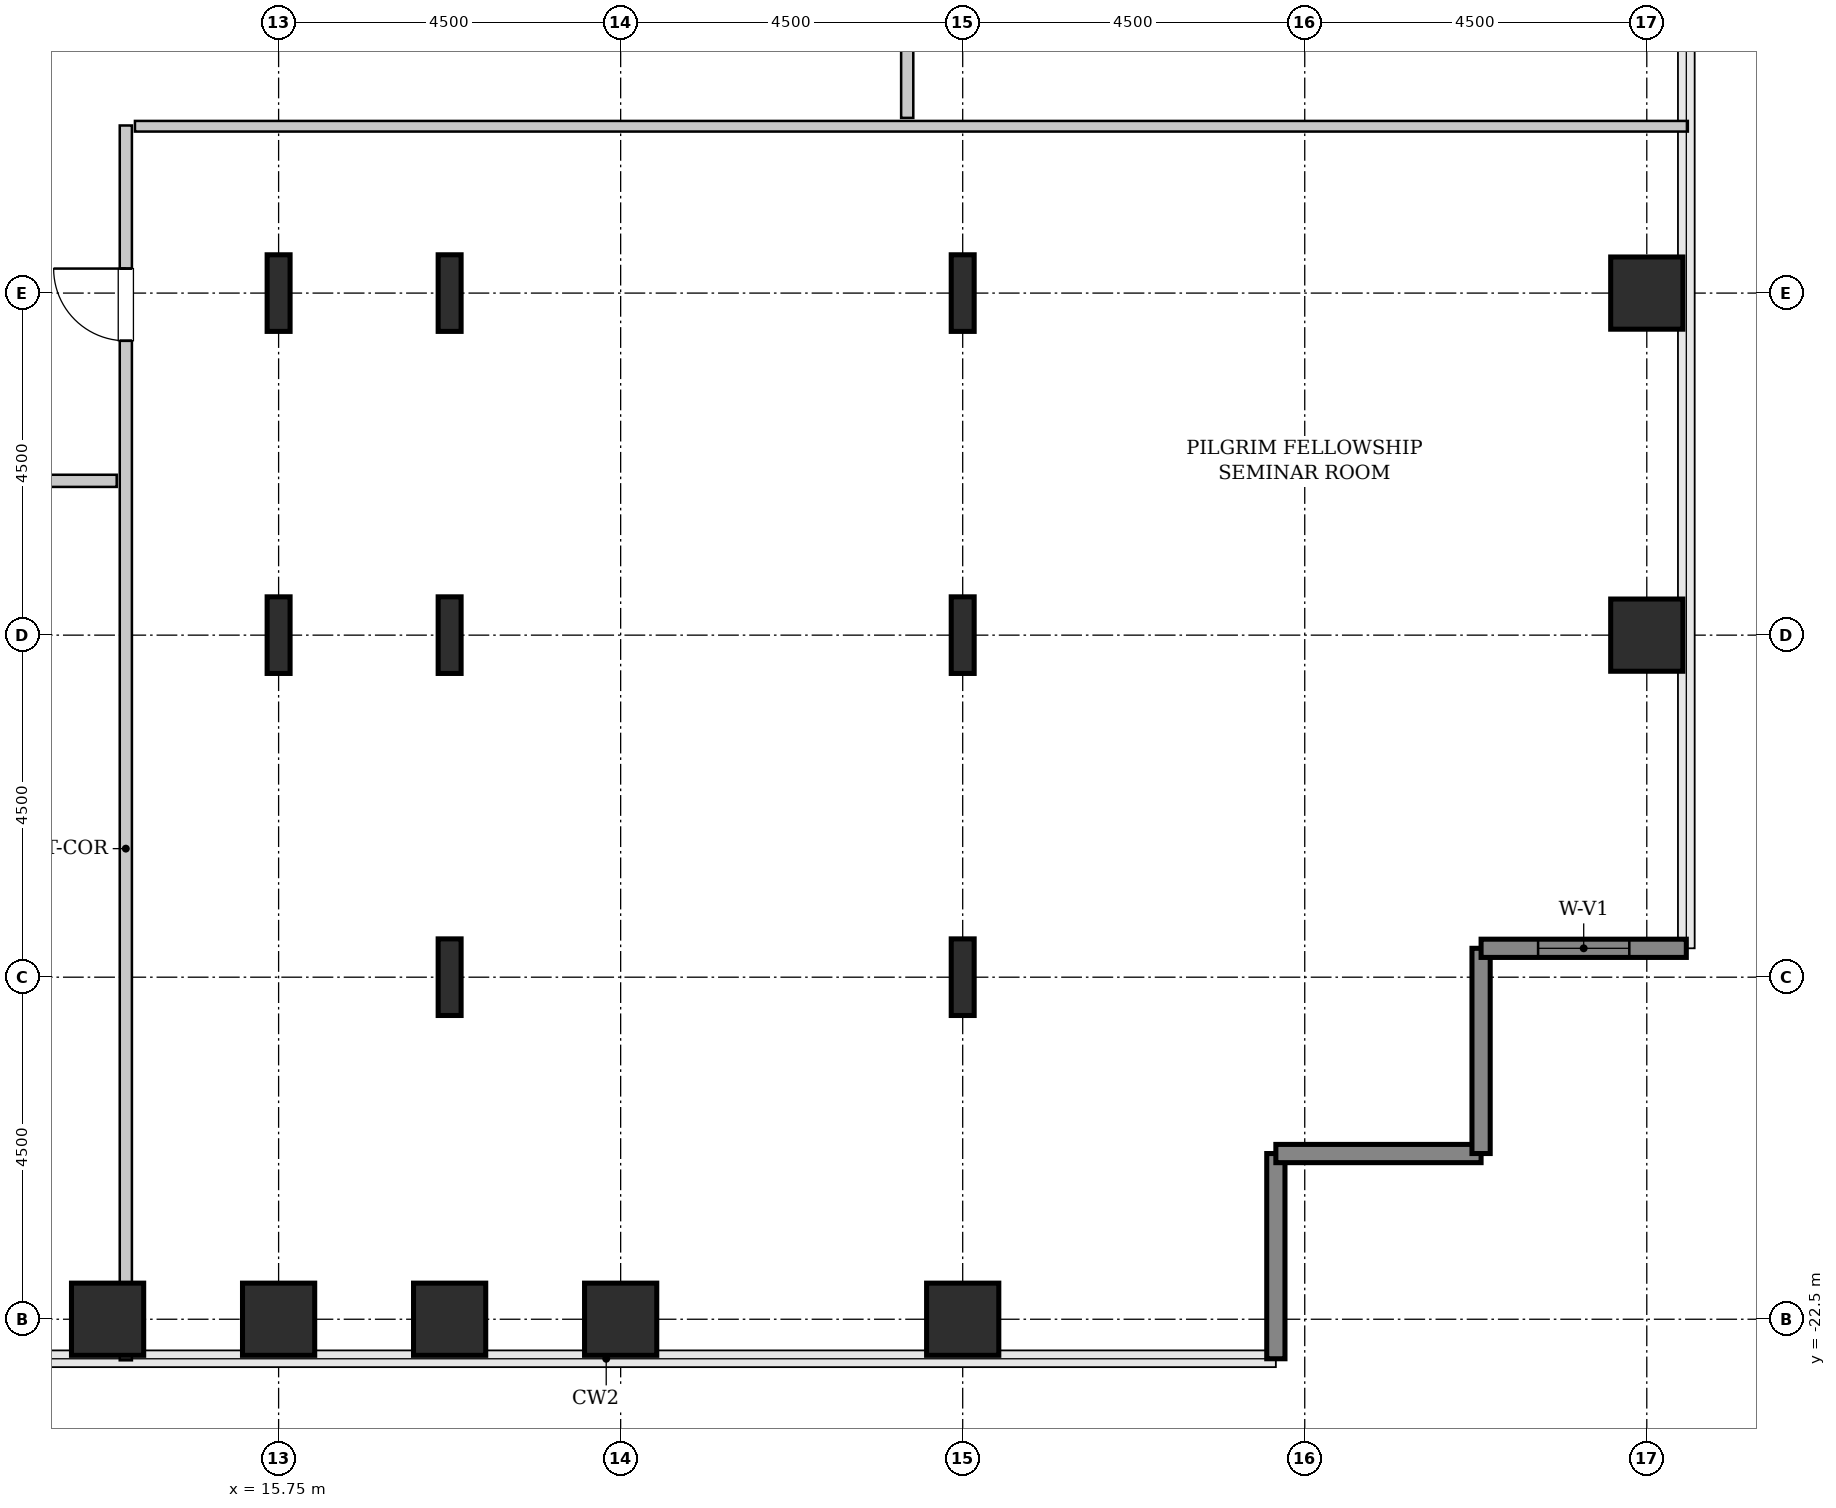
"""IFC4 building model, lengths in metres.
Left out: names, types, materials, properties, quantities, classifications, styles, units other than length and angle.
Written with IfcOpenShell. Run it as: python <this file> out.ifc"""

import sys

from ifc_helpers import new_model, si_unit, direction, frame, frame_2d, origin, origin_2d, place, context, subcontext, project, spatial, rectangle, hollow_rectangle, i_section, extrude, source, transform, mapped, element, fill, save


model = new_model("IFC4")
c1 = context("Model", 3, precision=1e-05, world=origin(), true_north=direction((0.0, 1.0)))
c2 = subcontext(c1, "Body", "Model", "MODEL_VIEW")
j1 = project(units=[si_unit("LENGTHUNIT", "METRE"), si_unit("PLANEANGLEUNIT", "RADIAN")], contexts=[c1])
p1 = place(None, origin())
s1 = spatial("IfcSite", under=j1, at=p1, CompositionType="ELEMENT")
p2 = place(p1, origin())
s2 = spatial("IfcBuilding", under=s1, at=p2, CompositionType="ELEMENT")
p3 = place(p2, frame((0.0, 0.0, 94.6)))
s3 = spatial("IfcBuildingStorey", under=s2, at=p3, CompositionType="ELEMENT", Elevation=94.6)
m1 = source(origin(), c2, "Body", "SweptSolid", [
    extrude(hollow_rectangle(XDim=0.95, YDim=0.95, WallThickness=0.045, InnerFilletRadius=0.045, OuterFilletRadius=0.09, at=origin_2d()), origin(), (0.0, 0.0, 1.0), 3.8),
])
for number, where, z_axis, x_axis in (
    (1, (13.5, -22.5, 0.0), (0.0, 0.0, 1.0), (1.0, 0.0, 0.0)),
    (2, (15.75, -22.5, 0.0), (0.0, 0.0, 1.0), (1.0, 0.0, 0.0)),
):
    element("IfcColumn", number, at=place(p3, frame(where, z_axis=z_axis, x_axis=x_axis)), inside=s3, PredefinedType="COLUMN", context=c2, shape_type="MappedRepresentation", body=[
        mapped(m1, transform((0.0, 0.0, 0.0), x_axis=(1.0, 0.0, 0.0), y_axis=(0.0, 1.0, 0.0), z_axis=(0.0, 0.0, 1.0), scale=1.0)),
    ])
m2 = source(origin(), c2, "Body", "SweptSolid", [
    extrude(i_section(OverallWidth=0.302, OverallDepth=1.008, WebThickness=0.021, FlangeThickness=0.04, FilletRadius=0.03, at=origin_2d()), origin(), (0.0, 0.0, 1.0), 3.8),
])
for number, where, z_axis, x_axis in (
    (3, (15.75, -13.5, 0.0), (0.0, 0.0, 1.0), (1.0, 0.0, 0.0)),
    (4, (15.75, -9.0, 0.0), (0.0, 0.0, 1.0), (1.0, 0.0, 0.0)),
):
    element("IfcColumn", number, at=place(p3, frame(where, z_axis=z_axis, x_axis=x_axis)), inside=s3, PredefinedType="COLUMN", context=c2, shape_type="MappedRepresentation", body=[
        mapped(m2, transform((0.0, 0.0, 0.0), x_axis=(1.0, 0.0, 0.0), y_axis=(0.0, 1.0, 0.0), z_axis=(0.0, 0.0, 1.0), scale=1.0)),
    ])
p4 = place(p3, frame((18.0, -22.5, 0.0), z_axis=(0.0, 0.0, 1.0), x_axis=(1.0, 0.0, 0.0)))
e5 = element("IfcColumn", 5, at=p4, inside=s3, PredefinedType="COLUMN", context=c2, shape_type="MappedRepresentation", body=[
    mapped(m1, transform((0.0, 0.0, 0.0), x_axis=(1.0, 0.0, 0.0), y_axis=(0.0, 1.0, 0.0), z_axis=(0.0, 0.0, 1.0), scale=1.0)),
])
for number, where, z_axis, x_axis in (
    (6, (18.0, -18.0, 0.0), (0.0, 0.0, 1.0), (1.0, 0.0, 0.0)),
    (7, (18.0, -13.5, 0.0), (0.0, 0.0, 1.0), (1.0, 0.0, 0.0)),
    (8, (18.0, -9.0, 0.0), (0.0, 0.0, 1.0), (1.0, 0.0, 0.0)),
):
    element("IfcColumn", number, at=place(p3, frame(where, z_axis=z_axis, x_axis=x_axis)), inside=s3, PredefinedType="COLUMN", context=c2, shape_type="MappedRepresentation", body=[
        mapped(m2, transform((0.0, 0.0, 0.0), x_axis=(1.0, 0.0, 0.0), y_axis=(0.0, 1.0, 0.0), z_axis=(0.0, 0.0, 1.0), scale=1.0)),
    ])
for number, where, z_axis, x_axis in (
    (9, (20.25, -22.5, 0.0), (0.0, 0.0, 1.0), (1.0, 0.0, 0.0)),
    (10, (24.75, -22.5, 0.0), (0.0, 0.0, 1.0), (1.0, 0.0, 0.0)),
):
    element("IfcColumn", number, at=place(p3, frame(where, z_axis=z_axis, x_axis=x_axis)), inside=s3, PredefinedType="COLUMN", context=c2, shape_type="MappedRepresentation", body=[
        mapped(m1, transform((0.0, 0.0, 0.0), x_axis=(1.0, 0.0, 0.0), y_axis=(0.0, 1.0, 0.0), z_axis=(0.0, 0.0, 1.0), scale=1.0)),
    ])
for number, where, z_axis, x_axis in (
    (11, (24.75, -18.0, 0.0), (0.0, 0.0, 1.0), (1.0, 0.0, 0.0)),
    (12, (24.75, -13.5, 0.0), (0.0, 0.0, 1.0), (1.0, 0.0, 0.0)),
    (13, (24.75, -9.0, 0.0), (0.0, 0.0, 1.0), (1.0, 0.0, 0.0)),
):
    element("IfcColumn", number, at=place(p3, frame(where, z_axis=z_axis, x_axis=x_axis)), inside=s3, PredefinedType="COLUMN", context=c2, shape_type="MappedRepresentation", body=[
        mapped(m2, transform((0.0, 0.0, 0.0), x_axis=(1.0, 0.0, 0.0), y_axis=(0.0, 1.0, 0.0), z_axis=(0.0, 0.0, 1.0), scale=1.0)),
    ])
for number, where, z_axis, x_axis in (
    (14, (33.75, -13.5, 0.0), (0.0, 0.0, 1.0), (1.0, 0.0, 0.0)),
    (15, (33.75, -9.0, 0.0), (0.0, 0.0, 1.0), (1.0, 0.0, 0.0)),
):
    element("IfcColumn", number, at=place(p3, frame(where, z_axis=z_axis, x_axis=x_axis)), inside=s3, PredefinedType="COLUMN", context=c2, shape_type="MappedRepresentation", body=[
        mapped(m1, transform((0.0, 0.0, 0.0), x_axis=(1.0, 0.0, 0.0), y_axis=(0.0, 1.0, 0.0), z_axis=(0.0, 0.0, 1.0), scale=1.0)),
    ])
m3 = source(origin(), c2, "Body", "SweptSolid", [
    extrude(rectangle(XDim=2.7, YDim=0.24, at=frame_2d((1.35, 0.0))), origin(), (0.0, 0.0, 1.0), 3.55),
])
for number, where, z_axis, x_axis in (
    (16, (28.87, -23.02, 0.0), (0.0, 0.0, 1.0), (0.0, 1.0, 0.0)),
    (17, (28.87, -20.32, 0.0), (0.0, 0.0, 1.0), (1.0, 0.0, 0.0)),
    (18, (31.57, -20.32, 0.0), (0.0, 0.0, 1.0), (0.0, 1.0, 0.0)),
):
    element("IfcWall", number, at=place(p3, frame(where, z_axis=z_axis, x_axis=x_axis)), inside=s3, PredefinedType="SHEAR", context=c2, shape_type="MappedRepresentation", body=[
        mapped(m3, transform((0.0, 0.0, 0.0), x_axis=(1.0, 0.0, 0.0), y_axis=(0.0, 1.0, 0.0), z_axis=(0.0, 0.0, 1.0), scale=1.0)),
    ])
p5 = place(p3, frame((31.57, -17.62, 0.0), z_axis=(0.0, 0.0, 1.0), x_axis=(1.0, 0.0, 0.0)))
e19 = element("IfcWall", 19, at=p5, inside=s3, PredefinedType="SHEAR", context=c2, shape_type="MappedRepresentation", body=[
    mapped(m3, transform((0.0, 0.0, 0.0), x_axis=(1.0, 0.0, 0.0), y_axis=(0.0, 1.0, 0.0), z_axis=(0.0, 0.0, 1.0), scale=1.0)),
])
p6 = place(p5, frame((0.75, 0.0, 0.85)))
e20 = element("IfcOpeningElement", 20, at=p6, cuts=e19, PredefinedType="OPENING", context=c2, shape_type="SweptSolid", body=[
    extrude(rectangle(XDim=1.2, YDim=1.8, at=frame_2d((0.6, 0.9))), frame((0.0, 0.13, 0.0), z_axis=(0.0, -1.0, 0.0), x_axis=(1.0, 0.0, 0.0)), (0.0, 0.0, 1.0), 0.26),
])
m4 = source(origin(), c2, "Body", "SweptSolid", [
    extrude(rectangle(XDim=16.245, YDim=0.16, at=frame_2d((8.123, 0.0))), origin(), (0.0, 0.0, 1.0), 3.535),
])
p7 = place(p3, frame((13.74, -23.04, 0.0), z_axis=(0.0, 0.0, 1.0), x_axis=(0.0, 1.0, 0.0)))
e21 = element("IfcWall", 21, at=p7, inside=s3, PredefinedType="PARTITIONING", context=c2, shape_type="MappedRepresentation", body=[
    mapped(m4, transform((0.0, 0.0, 0.0), x_axis=(1.0, 0.0, 0.0), y_axis=(0.0, 1.0, 0.0), z_axis=(0.0, 0.0, 1.0), scale=1.0)),
])
p8 = place(p7, frame((13.413, 0.0, 0.0)))
e22 = element("IfcOpeningElement", 22, at=p8, cuts=e21, PredefinedType="OPENING", context=c2, shape_type="SweptSolid", body=[
    extrude(rectangle(XDim=0.95, YDim=2.1, at=frame_2d((0.475, 1.05))), frame((0.0, 0.09, 0.0), z_axis=(0.0, -1.0, 0.0), x_axis=(1.0, 0.0, 0.0)), (0.0, 0.0, 1.0), 0.18),
])
m5 = source(origin(), c2, "Body", "SweptSolid", [
    extrude(rectangle(XDim=20.43, YDim=0.14, at=frame_2d((10.215, 0.0))), origin(), (0.0, 0.0, 1.0), 3.535),
])
p9 = place(p3, frame((13.86, -6.805, 0.0), z_axis=(0.0, 0.0, 1.0), x_axis=(1.0, 0.0, 0.0)))
e23 = element("IfcWall", 23, at=p9, inside=s3, PredefinedType="PARTITIONING", context=c2, shape_type="MappedRepresentation", body=[
    mapped(m5, transform((0.0, 0.0, 0.0), x_axis=(1.0, 0.0, 0.0), y_axis=(0.0, 1.0, 0.0), z_axis=(0.0, 0.0, 1.0), scale=1.0)),
])
m6 = source(origin(), c2, "Body", "SweptSolid", [
    extrude(rectangle(XDim=13.5, YDim=0.16, at=frame_2d((6.75, 0.0))), origin(), (0.0, 0.0, 1.0), 3.535),
])
p10 = place(p3, frame((24.02, -6.695, 0.0), z_axis=(0.0, 0.0, 1.0), x_axis=(0.0, 1.0, 0.0)))
e24 = element("IfcWall", 24, at=p10, inside=s3, PredefinedType="PARTITIONING", context=c2, shape_type="MappedRepresentation", body=[
    mapped(m6, transform((0.0, 0.0, 0.0), x_axis=(1.0, 0.0, 0.0), y_axis=(0.0, 1.0, 0.0), z_axis=(0.0, 0.0, 1.0), scale=1.0)),
])
p11 = place(p10, frame((3.97, 0.0, 0.0)))
e25 = element("IfcOpeningElement", 25, at=p11, cuts=e24, PredefinedType="OPENING", context=c2, shape_type="SweptSolid", body=[
    extrude(rectangle(XDim=0.95, YDim=2.1, at=frame_2d((0.475, 1.05))), frame((0.0, 0.09, 0.0), z_axis=(0.0, -1.0, 0.0), x_axis=(1.0, 0.0, 0.0)), (0.0, 0.0, 1.0), 0.18),
])
m7 = source(origin(), c2, "Body", "SweptSolid", [
    extrude(rectangle(XDim=6.225, YDim=0.16, at=frame_2d((3.113, 0.0))), origin(), (0.0, 0.0, 1.0), 3.535),
])
p12 = place(p3, frame((7.395, -11.47, 0.0), z_axis=(0.0, 0.0, 1.0), x_axis=(1.0, 0.0, 0.0)))
e26 = element("IfcWall", 26, at=p12, inside=s3, PredefinedType="PARTITIONING", context=c2, shape_type="MappedRepresentation", body=[
    mapped(m7, transform((0.0, 0.0, 0.0), x_axis=(1.0, 0.0, 0.0), y_axis=(0.0, 1.0, 0.0), z_axis=(0.0, 0.0, 1.0), scale=1.0)),
])
p13 = place(p12, frame((2.637, 0.0, 0.0)))
e27 = element("IfcOpeningElement", 27, at=p13, cuts=e26, PredefinedType="OPENING", context=c2, shape_type="SweptSolid", body=[
    extrude(rectangle(XDim=0.95, YDim=2.1, at=frame_2d((0.475, 1.05))), frame((0.0, 0.09, 0.0), z_axis=(0.0, -1.0, 0.0), x_axis=(1.0, 0.0, 0.0)), (0.0, 0.0, 1.0), 0.18),
])
m8 = source(origin(), c2, "Body", "SweptSolid", [
    extrude(rectangle(XDim=1.2, YDim=1.8, at=frame_2d((0.6, 0.9))), frame((0.0, 0.03, 0.0), z_axis=(0.0, -1.0, 0.0), x_axis=(1.0, 0.0, 0.0)), (0.0, 0.0, 1.0), 0.06),
])
p14 = place(p6, origin())
e28 = element("IfcWindow", 28, at=p14, inside=s3, PartitioningType="SINGLE_PANEL", PredefinedType="WINDOW", context=c2, shape_type="MappedRepresentation", body=[
    mapped(m8, transform((0.0, 0.0, 0.0), x_axis=(1.0, 0.0, 0.0), y_axis=(0.0, 1.0, 0.0), z_axis=(0.0, 0.0, 1.0), scale=1.0)),
])
fill(e20, e28)
m9 = source(origin(), c2, "Body", "SweptSolid", [
    extrude(rectangle(XDim=0.95, YDim=2.1, at=frame_2d((0.475, 1.05))), frame((0.0, 0.025, 0.0), z_axis=(0.0, -1.0, 0.0), x_axis=(1.0, 0.0, 0.0)), (0.0, 0.0, 1.0), 0.05),
])
p15 = place(p8, origin())
e29 = element("IfcDoor", 29, at=p15, inside=s3, OperationType="SINGLE_SWING_RIGHT", PredefinedType="DOOR", context=c2, shape_type="MappedRepresentation", body=[
    mapped(m9, transform((0.0, 0.0, 0.0), x_axis=(1.0, 0.0, 0.0), y_axis=(0.0, 1.0, 0.0), z_axis=(0.0, 0.0, 1.0), scale=1.0)),
])
fill(e22, e29)
save(model, sys.argv[1])
